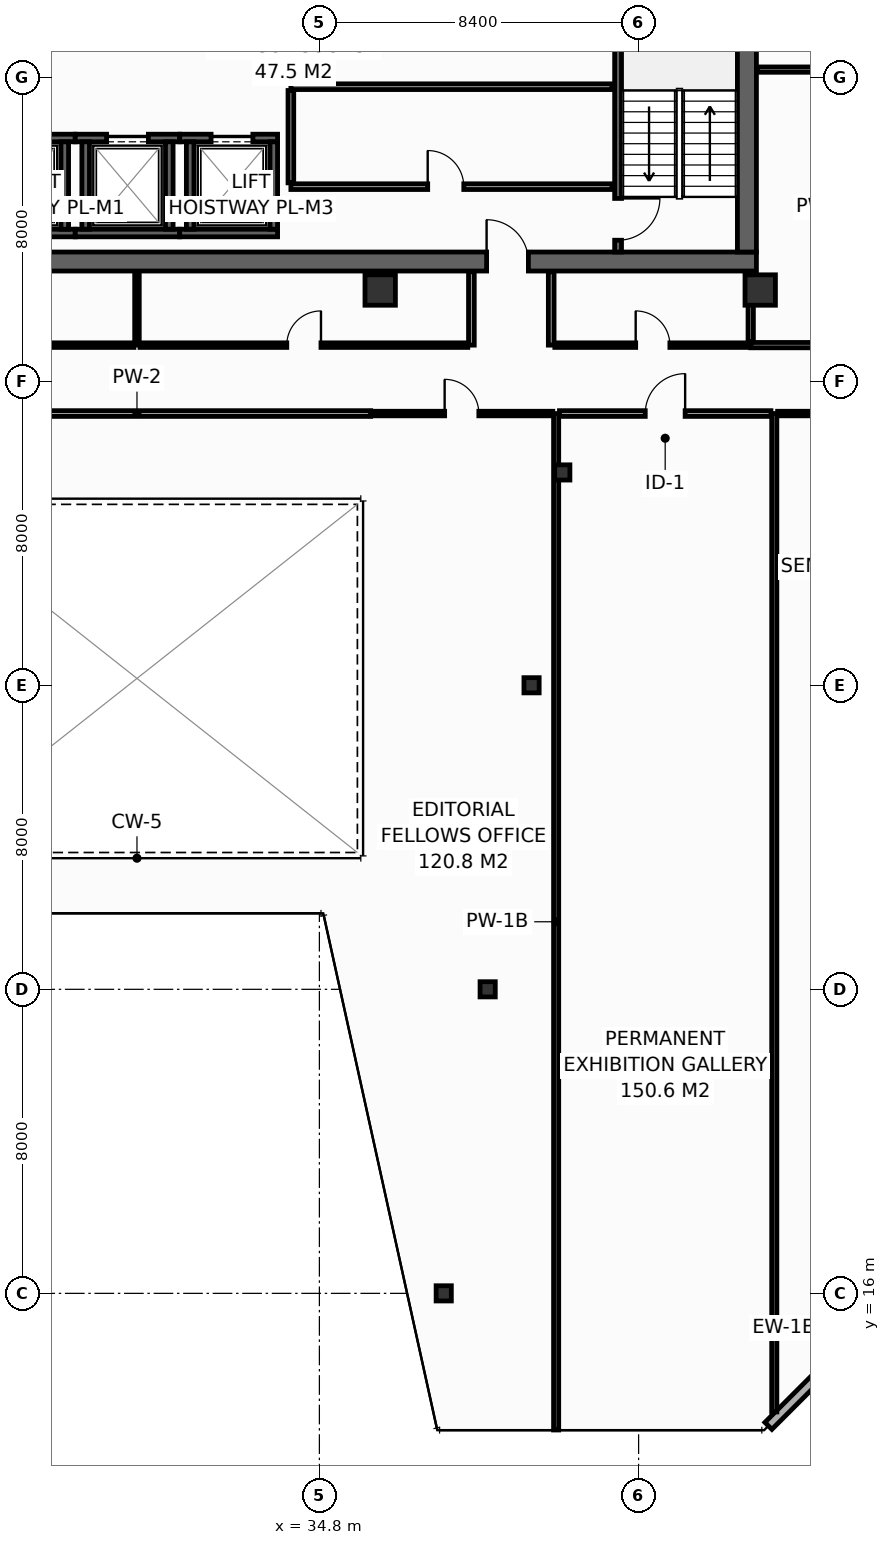
"""IFC4 building model, lengths in metres.
Left out: names, types, materials, properties, quantities, classifications, styles, units other than length and angle.
Written with IfcOpenShell. Run it as: python <this file> out.ifc"""

import sys

from ifc_helpers import new_model, si_unit, direction, frame, frame_2d, origin, origin_2d, place, context, subcontext, project, spatial, rectangle, hollow_rectangle, extrude, element, fill, save


model = new_model("IFC4")
c1 = context("Model", 3, precision=1e-05, world=origin(), true_north=direction((0.0, 1.0)))
c2 = subcontext(c1, "Body", "Model", "MODEL_VIEW")
j1 = project(units=[si_unit("LENGTHUNIT", "METRE"), si_unit("PLANEANGLEUNIT", "RADIAN")], contexts=[c1])
p1 = place(None, origin())
s1 = spatial("IfcSite", under=j1, at=p1, CompositionType="ELEMENT")
p2 = place(p1, origin())
s2 = spatial("IfcBuilding", under=s1, at=p2, CompositionType="ELEMENT")
p3 = place(p2, frame((0.0, 0.0, 182.8)))
s3 = spatial("IfcBuildingStorey", under=s2, at=p3, CompositionType="ELEMENT", Elevation=182.8)
p4 = place(p3, frame((13.6, 43.15, 0.0), z_axis=(0.0, 0.0, 1.0), x_axis=(1.0, 0.0, 0.0)))
e1 = element("IfcWall", 1, at=p4, inside=s3, PredefinedType="SHEAR", context=c2, shape_type="SweptSolid", body=[
    extrude(rectangle(XDim=32.7, YDim=0.5, at=frame_2d((16.35, 0.0))), origin(), (0.0, 0.0, 1.0), 3.55),
])
p5 = place(p4, frame((5.4, 0.0, 0.0)))
e2 = element("IfcOpeningElement", 2, at=p5, cuts=e1, PredefinedType="OPENING", context=c2, shape_type="SweptSolid", body=[
    extrude(rectangle(XDim=1.1, YDim=2.15, at=frame_2d((0.55, 1.075))), frame((0.0, 0.26, 0.0), z_axis=(0.0, -1.0, 0.0), x_axis=(1.0, 0.0, 0.0)), (0.0, 0.0, 1.0), 0.52),
])
p6 = place(p4, frame((25.6, 0.0, 0.0)))
e3 = element("IfcOpeningElement", 3, at=p6, cuts=e1, PredefinedType="OPENING", context=c2, shape_type="SweptSolid", body=[
    extrude(rectangle(XDim=1.1, YDim=2.15, at=frame_2d((0.55, 1.075))), frame((0.0, 0.26, 0.0), z_axis=(0.0, -1.0, 0.0), x_axis=(1.0, 0.0, 0.0)), (0.0, 0.0, 1.0), 0.52),
])
p7 = place(p3, frame((46.05, 43.4, 0.0), z_axis=(0.0, 0.0, 1.0), x_axis=(0.0, 1.0, 0.0)))
e4 = element("IfcWall", 4, at=p7, inside=s3, PredefinedType="SHEAR", context=c2, shape_type="SweptSolid", body=[
    extrude(rectangle(XDim=10.4, YDim=0.5, at=frame_2d((5.2, 0.0))), origin(), (0.0, 0.0, 1.0), 3.55),
])
for number, where, z_axis, x_axis in (
    (5, (36.4, 42.4, 0.0), (0.0, 0.0, 1.0), (1.0, 0.0, 0.0)),
    (6, (46.4, 42.4, 0.0), (0.0, 0.0, 1.0), (1.0, 0.0, 0.0)),
):
    element("IfcColumn", number, at=place(p3, frame(where, z_axis=z_axis, x_axis=x_axis)), inside=s3, PredefinedType="COLUMN", context=c2, shape_type="SweptSolid", body=[
        extrude(hollow_rectangle(XDim=0.8, YDim=0.8, WallThickness=0.036, at=origin_2d()), origin(), (0.0, 0.0, 1.0), 3.8),
    ])
for number, where, z_axis, x_axis in (
    (7, (38.072, 16.0, 0.0), (0.0, 0.0, 1.0), (1.0, 0.0, 0.0)),
    (8, (39.228, 24.0, 0.0), (0.0, 0.0, 1.0), (1.0, 0.0, 0.0)),
    (9, (40.383, 32.0, 0.0), (0.0, 0.0, 1.0), (1.0, 0.0, 0.0)),
    (10, (41.192, 37.6, 0.0), (0.0, 0.0, 1.0), (1.0, 0.0, 0.0)),
):
    element("IfcColumn", number, at=place(p3, frame(where, z_axis=z_axis, x_axis=x_axis)), inside=s3, PredefinedType="COLUMN", context=c2, shape_type="SweptSolid", body=[
        extrude(hollow_rectangle(XDim=0.4, YDim=0.4, WallThickness=0.016, at=origin_2d()), origin(), (0.0, 0.0, 1.0), 3.8),
    ])
p8 = place(p3, frame((25.8, 43.9, 0.0), z_axis=(0.0, 0.0, 1.0), x_axis=(1.0, 0.0, 0.0)))
e11 = element("IfcWall", 11, at=p8, inside=s3, PredefinedType="SHEAR", context=c2, shape_type="SweptSolid", body=[
    extrude(rectangle(XDim=2.575, YDim=0.2, at=frame_2d((1.288, 0.0))), origin(), (0.0, 0.0, 1.0), 3.55),
])
p9 = place(p3, frame((25.8, 46.4, 0.0), z_axis=(0.0, 0.0, 1.0), x_axis=(1.0, 0.0, 0.0)))
e12 = element("IfcWall", 12, at=p9, inside=s3, PredefinedType="SHEAR", context=c2, shape_type="SweptSolid", body=[
    extrude(rectangle(XDim=2.575, YDim=0.2, at=frame_2d((1.288, 0.0))), origin(), (0.0, 0.0, 1.0), 3.55),
])
p10 = place(p9, frame((0.65, 0.0, 0.0)))
e13 = element("IfcOpeningElement", 13, at=p10, cuts=e12, PredefinedType="OPENING", context=c2, shape_type="SweptSolid", body=[
    extrude(rectangle(XDim=1.1, YDim=2.2, at=frame_2d((0.55, 1.1))), frame((0.0, 0.11, 0.0), z_axis=(0.0, -1.0, 0.0), x_axis=(1.0, 0.0, 0.0)), (0.0, 0.0, 1.0), 0.22),
])
p11 = place(p3, frame((28.1, 44.0, 0.0), z_axis=(0.0, 0.0, 1.0), x_axis=(0.0, 1.0, 0.0)))
e14 = element("IfcWall", 14, at=p11, inside=s3, PredefinedType="SHEAR", context=c2, shape_type="SweptSolid", body=[
    extrude(rectangle(XDim=2.3, YDim=0.2, at=frame_2d((1.15, 0.0))), origin(), (0.0, 0.0, 1.0), 3.55),
])
p12 = place(p3, frame((28.375, 43.9, 0.0), z_axis=(0.0, 0.0, 1.0), x_axis=(1.0, 0.0, 0.0)))
e15 = element("IfcWall", 15, at=p12, inside=s3, PredefinedType="SHEAR", context=c2, shape_type="SweptSolid", body=[
    extrude(rectangle(XDim=2.75, YDim=0.2, at=frame_2d((1.375, 0.0))), origin(), (0.0, 0.0, 1.0), 3.55),
])
p13 = place(p3, frame((28.375, 46.4, 0.0), z_axis=(0.0, 0.0, 1.0), x_axis=(1.0, 0.0, 0.0)))
e16 = element("IfcWall", 16, at=p13, inside=s3, PredefinedType="SHEAR", context=c2, shape_type="SweptSolid", body=[
    extrude(rectangle(XDim=2.75, YDim=0.2, at=frame_2d((1.375, 0.0))), origin(), (0.0, 0.0, 1.0), 3.55),
])
p14 = place(p13, frame((0.825, 0.0, 0.0)))
e17 = element("IfcOpeningElement", 17, at=p14, cuts=e16, PredefinedType="OPENING", context=c2, shape_type="SweptSolid", body=[
    extrude(rectangle(XDim=1.1, YDim=2.2, at=frame_2d((0.55, 1.1))), frame((0.0, 0.11, 0.0), z_axis=(0.0, -1.0, 0.0), x_axis=(1.0, 0.0, 0.0)), (0.0, 0.0, 1.0), 0.22),
])
for number, where, z_axis, x_axis in (
    (18, (28.65, 44.0, 0.0), (0.0, 0.0, 1.0), (0.0, 1.0, 0.0)),
    (19, (30.85, 44.0, 0.0), (0.0, 0.0, 1.0), (0.0, 1.0, 0.0)),
):
    element("IfcWall", number, at=place(p3, frame(where, z_axis=z_axis, x_axis=x_axis)), inside=s3, PredefinedType="SHEAR", context=c2, shape_type="SweptSolid", body=[
        extrude(rectangle(XDim=2.3, YDim=0.2, at=frame_2d((1.15, 0.0))), origin(), (0.0, 0.0, 1.0), 3.55),
    ])
p15 = place(p3, frame((31.125, 43.9, 0.0), z_axis=(0.0, 0.0, 1.0), x_axis=(1.0, 0.0, 0.0)))
e20 = element("IfcWall", 20, at=p15, inside=s3, PredefinedType="SHEAR", context=c2, shape_type="SweptSolid", body=[
    extrude(rectangle(XDim=2.575, YDim=0.2, at=frame_2d((1.288, 0.0))), origin(), (0.0, 0.0, 1.0), 3.55),
])
p16 = place(p3, frame((31.125, 46.4, 0.0), z_axis=(0.0, 0.0, 1.0), x_axis=(1.0, 0.0, 0.0)))
e21 = element("IfcWall", 21, at=p16, inside=s3, PredefinedType="SHEAR", context=c2, shape_type="SweptSolid", body=[
    extrude(rectangle(XDim=2.575, YDim=0.2, at=frame_2d((1.288, 0.0))), origin(), (0.0, 0.0, 1.0), 3.55),
])
p17 = place(p16, frame((0.825, 0.0, 0.0)))
e22 = element("IfcOpeningElement", 22, at=p17, cuts=e21, PredefinedType="OPENING", context=c2, shape_type="SweptSolid", body=[
    extrude(rectangle(XDim=1.1, YDim=2.2, at=frame_2d((0.55, 1.1))), frame((0.0, 0.11, 0.0), z_axis=(0.0, -1.0, 0.0), x_axis=(1.0, 0.0, 0.0)), (0.0, 0.0, 1.0), 0.22),
])
for number, where, z_axis, x_axis in (
    (23, (31.4, 44.0, 0.0), (0.0, 0.0, 1.0), (0.0, 1.0, 0.0)),
    (24, (33.6, 44.0, 0.0), (0.0, 0.0, 1.0), (0.0, 1.0, 0.0)),
):
    element("IfcWall", number, at=place(p3, frame(where, z_axis=z_axis, x_axis=x_axis)), inside=s3, PredefinedType="SHEAR", context=c2, shape_type="SweptSolid", body=[
        extrude(rectangle(XDim=2.3, YDim=0.2, at=frame_2d((1.15, 0.0))), origin(), (0.0, 0.0, 1.0), 3.55),
    ])
p18 = place(p3, frame((42.66, 53.8, 0.0), z_axis=(0.0, 0.0, 1.0), x_axis=(0.0, -1.0, 0.0)))
e25 = element("IfcWall", 25, at=p18, inside=s3, PredefinedType="SHEAR", context=c2, shape_type="SweptSolid", body=[
    extrude(rectangle(XDim=10.4, YDim=0.18, at=frame_2d((5.2, 0.0))), origin(), (0.0, 0.0, 1.0), 3.55),
])
p19 = place(p18, frame((8.99, 0.0, 0.0)))
e26 = element("IfcOpeningElement", 26, at=p19, cuts=e25, PredefinedType="OPENING", context=c2, shape_type="SweptSolid", body=[
    extrude(rectangle(XDim=1.1, YDim=2.15, at=frame_2d((0.55, 1.075))), frame((0.0, 0.1, 0.0), z_axis=(0.0, -1.0, 0.0), x_axis=(1.0, 0.0, 0.0)), (0.0, 0.0, 1.0), 0.2),
])
p20 = place(p3, frame((34.05, 45.12, 0.0), z_axis=(0.0, 0.0, 1.0), x_axis=(1.0, 0.0, 0.0)))
e27 = element("IfcWall", 27, at=p20, inside=s3, PredefinedType="PARTITIONING", context=c2, shape_type="SweptSolid", body=[
    extrude(rectangle(XDim=8.45, YDim=0.15, at=frame_2d((4.225, 0.0))), origin(), (0.0, 0.0, 1.0), 3.55),
])
p21 = place(p20, frame((3.6, 0.0, 0.0)))
e28 = element("IfcOpeningElement", 28, at=p21, cuts=e27, PredefinedType="OPENING", context=c2, shape_type="SweptSolid", body=[
    extrude(rectangle(XDim=0.95, YDim=2.15, at=frame_2d((0.475, 1.075))), frame((0.0, 0.085, 0.0), z_axis=(0.0, -1.0, 0.0), x_axis=(1.0, 0.0, 0.0)), (0.0, 0.0, 1.0), 0.17),
])
p22 = place(p3, frame((34.05, 47.75, 0.0), z_axis=(0.0, 0.0, 1.0), x_axis=(1.0, 0.0, 0.0)))
e29 = element("IfcWall", 29, at=p22, inside=s3, PredefinedType="PARTITIONING", context=c2, shape_type="SweptSolid", body=[
    extrude(rectangle(XDim=8.45, YDim=0.15, at=frame_2d((4.225, 0.0))), origin(), (0.0, 0.0, 1.0), 3.55),
])
p23 = place(p3, frame((34.05, 45.22, 0.0), z_axis=(0.0, 0.0, 1.0), x_axis=(0.0, 1.0, 0.0)))
e30 = element("IfcWall", 30, at=p23, inside=s3, PredefinedType="PARTITIONING", context=c2, shape_type="SweptSolid", body=[
    extrude(rectangle(XDim=2.43, YDim=0.15, at=frame_2d((1.215, 0.0))), origin(), (0.0, 0.0, 1.0), 3.55),
])
p24 = place(p3, frame((46.615, 12.513, 0.0), z_axis=(0.0, 0.0, 1.0), x_axis=(0.707135806771, 0.70707775441, 0.0)))
e31 = element("IfcWall", 31, at=p24, inside=s3, PredefinedType="STANDARD", context=c2, shape_type="SweptSolid", body=[
    extrude(rectangle(XDim=4.206, YDim=0.26, at=frame_2d((2.103, 0.0))), origin(), (0.0, 0.0, 1.0), 3.55),
])
p25 = place(p3, frame((46.15, 40.95, 0.0), z_axis=(0.0, 0.0, 1.0), x_axis=(1.0, 0.0, 0.0)))
e32 = element("IfcWall", 32, at=p25, inside=s3, PredefinedType="PARTITIONING", context=c2, shape_type="SweptSolid", body=[
    extrude(rectangle(XDim=4.05, YDim=0.14, at=frame_2d((2.025, 0.0))), origin(), (0.0, 0.0, 1.0), 3.55),
])
p26 = place(p3, frame((46.15, 41.04, 0.0), z_axis=(0.0, 0.0, 1.0), x_axis=(0.0, 1.0, 0.0)))
e33 = element("IfcWall", 33, at=p26, inside=s3, PredefinedType="PARTITIONING", context=c2, shape_type="SweptSolid", body=[
    extrude(rectangle(XDim=1.84, YDim=0.14, at=frame_2d((0.92, 0.0))), origin(), (0.0, 0.0, 1.0), 3.55),
])
p27 = place(p3, frame((46.32, 48.2, 0.0), z_axis=(0.0, 0.0, 1.0), x_axis=(1.0, 0.0, 0.0)))
e34 = element("IfcWall", 34, at=p27, inside=s3, PredefinedType="PARTITIONING", context=c2, shape_type="SweptSolid", body=[
    extrude(rectangle(XDim=3.88, YDim=0.14, at=frame_2d((1.94, 0.0))), origin(), (0.0, 0.0, 1.0), 3.55),
])
for number, where, z_axis, x_axis in (
    (35, (38.8, 40.95, 0.0), (0.0, 0.0, 1.0), (0.0, 1.0, 0.0)),
    (36, (40.9, 40.95, 0.0), (0.0, 0.0, 1.0), (0.0, 1.0, 0.0)),
):
    element("IfcWall", number, at=place(p3, frame(where, z_axis=z_axis, x_axis=x_axis)), inside=s3, PredefinedType="PARTITIONING", context=c2, shape_type="SweptSolid", body=[
        extrude(rectangle(XDim=1.93, YDim=0.15, at=frame_2d((0.965, 0.0))), origin(), (0.0, 0.0, 1.0), 3.55),
    ])
p28 = place(p3, frame((30.0, 40.95, 0.0), z_axis=(0.0, 0.0, 1.0), x_axis=(0.0, 1.0, 0.0)))
e37 = element("IfcWall", 37, at=p28, inside=s3, PredefinedType="PARTITIONING", context=c2, shape_type="SweptSolid", body=[
    extrude(rectangle(XDim=1.93, YDim=0.12, at=frame_2d((0.965, 0.0))), origin(), (0.0, 0.0, 1.0), 2.835),
])
p29 = place(p3, frame((20.795, 40.95, 0.0), z_axis=(0.0, 0.0, 1.0), x_axis=(1.0, 0.0, 0.0)))
e38 = element("IfcWall", 38, at=p29, inside=s3, PredefinedType="PARTITIONING", context=c2, shape_type="SweptSolid", body=[
    extrude(rectangle(XDim=9.125, YDim=0.12, at=frame_2d((4.562, 0.0))), origin(), (0.0, 0.0, 1.0), 2.835),
])
p30 = place(p29, frame((4.112, 0.0, 0.0)))
e39 = element("IfcOpeningElement", 39, at=p30, cuts=e38, PredefinedType="OPENING", context=c2, shape_type="SweptSolid", body=[
    extrude(rectangle(XDim=0.9, YDim=2.1, at=frame_2d((0.45, 1.05))), frame((0.0, 0.07, 0.0), z_axis=(0.0, -1.0, 0.0), x_axis=(1.0, 0.0, 0.0)), (0.0, 0.0, 1.0), 0.14),
])
p31 = place(p3, frame((30.08, 40.95, 0.0), z_axis=(0.0, 0.0, 1.0), x_axis=(1.0, 0.0, 0.0)))
e40 = element("IfcWall", 40, at=p31, inside=s3, PredefinedType="PARTITIONING", context=c2, shape_type="SweptSolid", body=[
    extrude(rectangle(XDim=8.625, YDim=0.12, at=frame_2d((4.312, 0.0))), origin(), (0.0, 0.0, 1.0), 2.835),
])
p32 = place(p31, frame((3.862, 0.0, 0.0)))
e41 = element("IfcOpeningElement", 41, at=p32, cuts=e40, PredefinedType="OPENING", context=c2, shape_type="SweptSolid", body=[
    extrude(rectangle(XDim=0.9, YDim=2.1, at=frame_2d((0.45, 1.05))), frame((0.0, 0.07, 0.0), z_axis=(0.0, -1.0, 0.0), x_axis=(1.0, 0.0, 0.0)), (0.0, 0.0, 1.0), 0.14),
])
p33 = place(p3, frame((40.995, 40.95, 0.0), z_axis=(0.0, 0.0, 1.0), x_axis=(1.0, 0.0, 0.0)))
e42 = element("IfcWall", 42, at=p33, inside=s3, PredefinedType="PARTITIONING", context=c2, shape_type="SweptSolid", body=[
    extrude(rectangle(XDim=5.155, YDim=0.12, at=frame_2d((2.577, 0.0))), origin(), (0.0, 0.0, 1.0), 3.55),
])
p34 = place(p33, frame((2.128, 0.0, 0.0)))
e43 = element("IfcOpeningElement", 43, at=p34, cuts=e42, PredefinedType="OPENING", context=c2, shape_type="SweptSolid", body=[
    extrude(rectangle(XDim=0.9, YDim=2.1, at=frame_2d((0.45, 1.05))), frame((0.0, 0.07, 0.0), z_axis=(0.0, -1.0, 0.0), x_axis=(1.0, 0.0, 0.0)), (0.0, 0.0, 1.0), 0.14),
])
p35 = place(p3, frame((41.03, 12.405, 0.0), z_axis=(0.0, 0.0, 1.0), x_axis=(0.0, 1.0, 0.0)))
e44 = element("IfcWall", 44, at=p35, inside=s3, PredefinedType="PARTITIONING", context=c2, shape_type="SweptSolid", body=[
    extrude(rectangle(XDim=26.745, YDim=0.135, at=frame_2d((13.373, 0.0))), origin(), (0.0, 0.0, 1.0), 2.835),
])
p36 = place(p3, frame((46.77, 12.88, 0.0), z_axis=(0.0, 0.0, 1.0), x_axis=(0.0, 1.0, 0.0)))
e45 = element("IfcWall", 45, at=p36, inside=s3, PredefinedType="PARTITIONING", context=c2, shape_type="SweptSolid", body=[
    extrude(rectangle(XDim=26.27, YDim=0.135, at=frame_2d((13.135, 0.0))), origin(), (0.0, 0.0, 1.0), 2.835),
])
p37 = place(p3, frame((23.85, 39.15, 0.0), z_axis=(0.0, 0.0, 1.0), x_axis=(1.0, 0.0, 0.0)))
e46 = element("IfcWall", 46, at=p37, inside=s3, PredefinedType="PARTITIONING", context=c2, shape_type="SweptSolid", body=[
    extrude(rectangle(XDim=12.3, YDim=0.15, at=frame_2d((6.15, 0.0))), origin(), (0.0, 0.0, 1.0), 3.55),
])
p38 = place(p3, frame((36.15, 39.15, 0.0), z_axis=(0.0, 0.0, 1.0), x_axis=(1.0, 0.0, 0.0)))
e47 = element("IfcWall", 47, at=p38, inside=s3, PredefinedType="PARTITIONING", context=c2, shape_type="SweptSolid", body=[
    extrude(rectangle(XDim=4.792, YDim=0.12, at=frame_2d((2.396, 0.0))), origin(), (0.0, 0.0, 1.0), 2.835),
])
p39 = place(p38, frame((1.946, 0.0, 0.0)))
e48 = element("IfcOpeningElement", 48, at=p39, cuts=e47, PredefinedType="OPENING", context=c2, shape_type="SweptSolid", body=[
    extrude(rectangle(XDim=0.9, YDim=2.1, at=frame_2d((0.45, 1.05))), frame((0.0, 0.07, 0.0), z_axis=(0.0, -1.0, 0.0), x_axis=(1.0, 0.0, 0.0)), (0.0, 0.0, 1.0), 0.14),
])
p40 = place(p3, frame((41.117, 39.15, 0.0), z_axis=(0.0, 0.0, 1.0), x_axis=(1.0, 0.0, 0.0)))
e49 = element("IfcWall", 49, at=p40, inside=s3, PredefinedType="PARTITIONING", context=c2, shape_type="SweptSolid", body=[
    extrude(rectangle(XDim=5.565, YDim=0.15, at=frame_2d((2.783, 0.0))), origin(), (0.0, 0.0, 1.0), 3.55),
])
p41 = place(p40, frame((2.257, 0.0, 0.0)))
e50 = element("IfcOpeningElement", 50, at=p41, cuts=e49, PredefinedType="OPENING", context=c2, shape_type="SweptSolid", body=[
    extrude(rectangle(XDim=1.05, YDim=2.15, at=frame_2d((0.525, 1.075))), frame((0.0, 0.085, 0.0), z_axis=(0.0, -1.0, 0.0), x_axis=(1.0, 0.0, 0.0)), (0.0, 0.0, 1.0), 0.17),
])
p42 = place(p3, frame((46.857, 39.15, 0.0), z_axis=(0.0, 0.0, 1.0), x_axis=(1.0, 0.0, 0.0)))
e51 = element("IfcWall", 51, at=p42, inside=s3, PredefinedType="PARTITIONING", context=c2, shape_type="SweptSolid", body=[
    extrude(rectangle(XDim=6.809, YDim=0.12, at=frame_2d((3.404, 0.0))), origin(), (0.0, 0.0, 1.0), 3.035),
])
p43 = place(p42, frame((2.954, 0.0, 0.0)))
e52 = element("IfcOpeningElement", 52, at=p43, cuts=e51, PredefinedType="OPENING", context=c2, shape_type="SweptSolid", body=[
    extrude(rectangle(XDim=0.9, YDim=2.1, at=frame_2d((0.45, 1.05))), frame((0.0, 0.07, 0.0), z_axis=(0.0, -1.0, 0.0), x_axis=(1.0, 0.0, 0.0)), (0.0, 0.0, 1.0), 0.14),
])
p44 = place(p14, origin())
e53 = element("IfcDoor", 53, at=p44, inside=s3, OperationType="SLIDING_TO_LEFT", PredefinedType="DOOR", context=c2, shape_type="SweptSolid", body=[
    extrude(rectangle(XDim=1.1, YDim=2.2, at=frame_2d((0.55, 1.1))), frame((0.0, 0.025, 0.0), z_axis=(0.0, -1.0, 0.0), x_axis=(1.0, 0.0, 0.0)), (0.0, 0.0, 1.0), 0.05),
])
fill(e17, e53)
p45 = place(p17, origin())
e54 = element("IfcDoor", 54, at=p45, inside=s3, OperationType="SLIDING_TO_LEFT", PredefinedType="DOOR", context=c2, shape_type="SweptSolid", body=[
    extrude(rectangle(XDim=1.1, YDim=2.2, at=frame_2d((0.55, 1.1))), frame((0.0, 0.025, 0.0), z_axis=(0.0, -1.0, 0.0), x_axis=(1.0, 0.0, 0.0)), (0.0, 0.0, 1.0), 0.05),
])
fill(e22, e54)
p46 = place(p19, origin())
e55 = element("IfcDoor", 55, at=p46, inside=s3, OperationType="SINGLE_SWING_LEFT", PredefinedType="DOOR", context=c2, shape_type="SweptSolid", body=[
    extrude(rectangle(XDim=1.1, YDim=2.15, at=frame_2d((0.55, 1.075))), frame((0.0, 0.025, 0.0), z_axis=(0.0, -1.0, 0.0), x_axis=(1.0, 0.0, 0.0)), (0.0, 0.0, 1.0), 0.05),
])
fill(e26, e55)
p47 = place(p6, origin())
e56 = element("IfcDoor", 56, at=p47, inside=s3, OperationType="SINGLE_SWING_LEFT", PredefinedType="DOOR", context=c2, shape_type="SweptSolid", body=[
    extrude(rectangle(XDim=1.1, YDim=2.15, at=frame_2d((0.55, 1.075))), frame((0.0, 0.025, 0.0), z_axis=(0.0, -1.0, 0.0), x_axis=(1.0, 0.0, 0.0)), (0.0, 0.0, 1.0), 0.05),
])
fill(e3, e56)
p48 = place(p21, origin())
e57 = element("IfcDoor", 57, at=p48, inside=s3, OperationType="SINGLE_SWING_LEFT", PredefinedType="DOOR", context=c2, shape_type="SweptSolid", body=[
    extrude(rectangle(XDim=0.95, YDim=2.15, at=frame_2d((0.475, 1.075))), frame((0.0, 0.025, 0.0), z_axis=(0.0, -1.0, 0.0), x_axis=(1.0, 0.0, 0.0)), (0.0, 0.0, 1.0), 0.05),
])
fill(e28, e57)
p49 = place(p32, origin())
e58 = element("IfcDoor", 58, at=p49, inside=s3, OperationType="SINGLE_SWING_RIGHT", PredefinedType="DOOR", context=c2, shape_type="SweptSolid", body=[
    extrude(rectangle(XDim=0.9, YDim=2.1, at=frame_2d((0.45, 1.05))), frame((0.0, 0.025, 0.0), z_axis=(0.0, -1.0, 0.0), x_axis=(1.0, 0.0, 0.0)), (0.0, 0.0, 1.0), 0.05),
])
fill(e41, e58)
p50 = place(p34, origin())
e59 = element("IfcDoor", 59, at=p50, inside=s3, OperationType="SINGLE_SWING_LEFT", PredefinedType="DOOR", context=c2, shape_type="SweptSolid", body=[
    extrude(rectangle(XDim=0.9, YDim=2.1, at=frame_2d((0.45, 1.05))), frame((0.0, 0.025, 0.0), z_axis=(0.0, -1.0, 0.0), x_axis=(1.0, 0.0, 0.0)), (0.0, 0.0, 1.0), 0.05),
])
fill(e43, e59)
p51 = place(p39, origin())
e60 = element("IfcDoor", 60, at=p51, inside=s3, OperationType="SINGLE_SWING_LEFT", PredefinedType="DOOR", context=c2, shape_type="SweptSolid", body=[
    extrude(rectangle(XDim=0.9, YDim=2.1, at=frame_2d((0.45, 1.05))), frame((0.0, 0.025, 0.0), z_axis=(0.0, -1.0, 0.0), x_axis=(1.0, 0.0, 0.0)), (0.0, 0.0, 1.0), 0.05),
])
fill(e48, e60)
p52 = place(p41, origin())
e61 = element("IfcDoor", 61, at=p52, inside=s3, OperationType="SINGLE_SWING_RIGHT", PredefinedType="DOOR", context=c2, shape_type="SweptSolid", body=[
    extrude(rectangle(XDim=1.05, YDim=2.15, at=frame_2d((0.525, 1.075))), frame((0.0, 0.025, 0.0), z_axis=(0.0, -1.0, 0.0), x_axis=(1.0, 0.0, 0.0)), (0.0, 0.0, 1.0), 0.05),
])
fill(e50, e61)
save(model, sys.argv[1])
